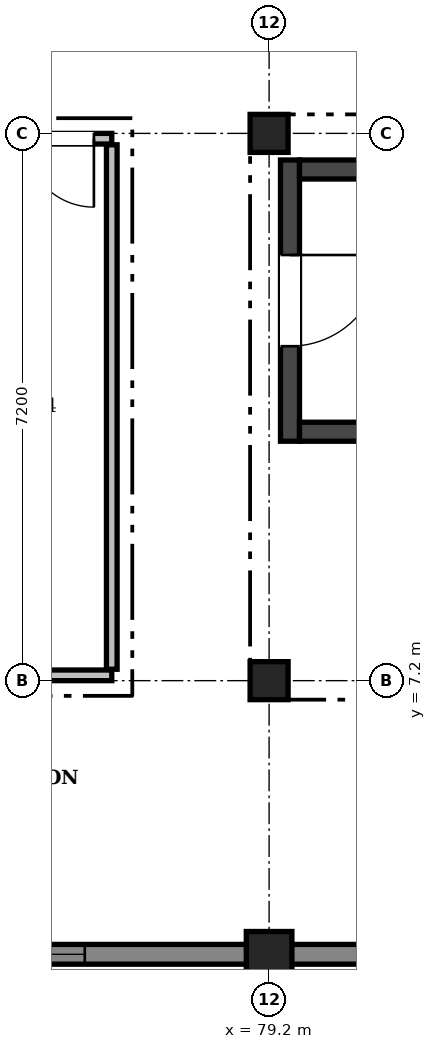
"""IFC4 building model, lengths in metres.
Left out: names, types, materials, properties, quantities, classifications, styles, units other than length and angle.
Written with IfcOpenShell. Run it as: python <this file> out.ifc"""

import sys

from ifc_helpers import new_model, si_unit, direction, frame, frame_2d, origin, origin_2d, place, context, subcontext, project, spatial, rectangle, extrude, element, fill, save


model = new_model("IFC4")
c1 = context("Model", 3, precision=1e-05, world=origin(), true_north=direction((0.0, 1.0)))
c2 = subcontext(c1, "Body", "Model", "MODEL_VIEW")
j1 = project(units=[si_unit("LENGTHUNIT", "METRE"), si_unit("PLANEANGLEUNIT", "RADIAN")], contexts=[c1])
p1 = place(None, origin())
s1 = spatial("IfcSite", under=j1, at=p1, CompositionType="ELEMENT")
p2 = place(p1, origin())
s2 = spatial("IfcBuilding", under=s1, at=p2, CompositionType="ELEMENT")
p3 = place(p2, frame((0.0, 0.0, 32.4)))
s3 = spatial("IfcBuildingStorey", under=s2, at=p3, CompositionType="ELEMENT", Elevation=32.4)
p4 = place(p3, frame((79.2, 3.6, 0.0), z_axis=(0.0, 0.0, 1.0), x_axis=(1.0, 0.0, 0.0)))
e1 = element("IfcColumn", 1, at=p4, inside=s3, PredefinedType="COLUMN", context=c2, shape_type="SweptSolid", body=[
    extrude(rectangle(XDim=0.6, YDim=0.6, at=origin_2d()), origin(), (0.0, 0.0, 1.0), 4.5),
])
for number, where, z_axis, x_axis in (
    (2, (79.2, 7.2, 0.0), (0.0, 0.0, 1.0), (1.0, 0.0, 0.0)),
    (3, (79.2, 14.4, 0.0), (0.0, 0.0, 1.0), (1.0, 0.0, 0.0)),
):
    element("IfcColumn", number, at=place(p3, frame(where, z_axis=z_axis, x_axis=x_axis)), inside=s3, PredefinedType="COLUMN", context=c2, shape_type="SweptSolid", body=[
        extrude(rectangle(XDim=0.5, YDim=0.5, at=origin_2d()), origin(), (0.0, 0.0, 1.0), 4.5),
    ])
p5 = place(p3, frame((86.4, 3.6, 0.0), z_axis=(0.0, 0.0, 1.0), x_axis=(-1.0, 0.0, 0.0)))
e4 = element("IfcWall", 4, at=p5, inside=s3, PredefinedType="SOLIDWALL", context=c2, shape_type="SweptSolid", body=[
    extrude(rectangle(XDim=7.2, YDim=0.26, at=frame_2d((3.6, 0.0))), origin(), (0.0, 0.0, 1.0), 4.22),
])
p6 = place(p5, frame((2.45, 0.0, 0.95)))
e5 = element("IfcOpeningElement", 5, at=p6, cuts=e4, PredefinedType="OPENING", context=c2, shape_type="SweptSolid", body=[
    extrude(rectangle(XDim=2.3, YDim=1.3, at=frame_2d((1.15, 0.65))), frame((0.0, 0.142, 0.0), z_axis=(0.0, -1.0, 0.0), x_axis=(1.0, 0.0, 0.0)), (0.0, 0.0, 1.0), 0.284),
])
p7 = place(p3, frame((79.2, 3.6, 0.0), z_axis=(0.0, 0.0, 1.0), x_axis=(-1.0, 0.0, 0.0)))
e6 = element("IfcWall", 6, at=p7, inside=s3, PredefinedType="SOLIDWALL", context=c2, shape_type="SweptSolid", body=[
    extrude(rectangle(XDim=7.35, YDim=0.26, at=frame_2d((3.675, 0.0))), origin(), (0.0, 0.0, 1.0), 4.22),
])
p8 = place(p7, frame((2.425, 0.0, 0.95)))
e7 = element("IfcOpeningElement", 7, at=p8, cuts=e6, PredefinedType="OPENING", context=c2, shape_type="SweptSolid", body=[
    extrude(rectangle(XDim=2.5, YDim=1.3, at=frame_2d((1.25, 0.65))), frame((0.0, 0.142, 0.0), z_axis=(0.0, -1.0, 0.0), x_axis=(1.0, 0.0, 0.0)), (0.0, 0.0, 1.0), 0.284),
])
p9 = place(p3, frame((79.475, 10.35, 0.0), z_axis=(0.0, 0.0, 1.0), x_axis=(0.0, 1.0, 0.0)))
e8 = element("IfcWall", 8, at=p9, inside=s3, PredefinedType="SHEAR", context=c2, shape_type="SweptSolid", body=[
    extrude(rectangle(XDim=3.7, YDim=0.25, at=frame_2d((1.85, 0.0))), origin(), (0.0, 0.0, 1.0), 4.25),
])
p10 = place(p9, frame((1.25, 0.0, 0.0)))
e9 = element("IfcOpeningElement", 9, at=p10, cuts=e8, PredefinedType="OPENING", context=c2, shape_type="SweptSolid", body=[
    extrude(rectangle(XDim=1.2, YDim=2.15, at=frame_2d((0.6, 1.075))), frame((0.0, 0.137, 0.0), z_axis=(0.0, -1.0, 0.0), x_axis=(1.0, 0.0, 0.0)), (0.0, 0.0, 1.0), 0.274),
])
for number, where, z_axis, x_axis in (
    (10, (79.6, 10.475, 0.0), (0.0, 0.0, 1.0), (1.0, 0.0, 0.0)),
    (11, (79.6, 13.925, 0.0), (0.0, 0.0, 1.0), (1.0, 0.0, 0.0)),
):
    element("IfcWall", number, at=place(p3, frame(where, z_axis=z_axis, x_axis=x_axis)), inside=s3, PredefinedType="SHEAR", context=c2, shape_type="SweptSolid", body=[
        extrude(rectangle(XDim=7.6, YDim=0.25, at=frame_2d((3.8, 0.0))), origin(), (0.0, 0.0, 1.0), 4.25),
    ])
p11 = place(p3, frame((72.07, 7.27, 0.0), z_axis=(0.0, 0.0, 1.0), x_axis=(1.0, 0.0, 0.0)))
e12 = element("IfcWall", 12, at=p11, inside=s3, PredefinedType="PARTITIONING", context=c2, shape_type="SweptSolid", body=[
    extrude(rectangle(XDim=5.06, YDim=0.14, at=frame_2d((2.53, 0.0))), origin(), (0.0, 0.0, 1.0), 3.78),
])
p12 = place(p3, frame((72.07, 14.33, 0.0), z_axis=(0.0, 0.0, 1.0), x_axis=(1.0, 0.0, 0.0)))
e13 = element("IfcWall", 13, at=p12, inside=s3, PredefinedType="PARTITIONING", context=c2, shape_type="SweptSolid", body=[
    extrude(rectangle(XDim=5.06, YDim=0.14, at=frame_2d((2.53, 0.0))), origin(), (0.0, 0.0, 1.0), 3.78),
])
p13 = place(p12, frame((0.88, 0.0, 0.0)))
e14 = element("IfcOpeningElement", 14, at=p13, cuts=e13, PredefinedType="OPENING", context=c2, shape_type="SweptSolid", body=[
    extrude(rectangle(XDim=0.94, YDim=2.1, at=frame_2d((0.47, 1.05))), frame((0.0, 0.082, 0.0), z_axis=(0.0, -1.0, 0.0), x_axis=(1.0, 0.0, 0.0)), (0.0, 0.0, 1.0), 0.164),
])
p14 = place(p12, frame((2.415, 0.0, 0.0)))
e15 = element("IfcOpeningElement", 15, at=p14, cuts=e13, PredefinedType="OPENING", context=c2, shape_type="SweptSolid", body=[
    extrude(rectangle(XDim=0.9, YDim=2.08, at=frame_2d((0.45, 1.04))), frame((0.0, 0.082, 0.0), z_axis=(0.0, -1.0, 0.0), x_axis=(1.0, 0.0, 0.0)), (0.0, 0.0, 1.0), 0.164),
])
p15 = place(p12, frame((3.925, 0.0, 0.0)))
e16 = element("IfcOpeningElement", 16, at=p15, cuts=e13, PredefinedType="OPENING", context=c2, shape_type="SweptSolid", body=[
    extrude(rectangle(XDim=0.9, YDim=2.08, at=frame_2d((0.45, 1.04))), frame((0.0, 0.082, 0.0), z_axis=(0.0, -1.0, 0.0), x_axis=(1.0, 0.0, 0.0)), (0.0, 0.0, 1.0), 0.164),
])
p16 = place(p3, frame((77.13, 7.35, 0.0), z_axis=(0.0, 0.0, 1.0), x_axis=(0.0, 1.0, 0.0)))
e17 = element("IfcWall", 17, at=p16, inside=s3, PredefinedType="PARTITIONING", context=c2, shape_type="SweptSolid", body=[
    extrude(rectangle(XDim=6.9, YDim=0.14, at=frame_2d((3.45, 0.0))), origin(), (0.0, 0.0, 1.0), 4.16),
])
p17 = place(p8, origin())
e18 = element("IfcWindow", 18, at=p17, inside=s3, PartitioningType="SINGLE_PANEL", PredefinedType="WINDOW", context=c2, shape_type="SweptSolid", body=[
    extrude(rectangle(XDim=2.5, YDim=1.3, at=frame_2d((1.25, 0.65))), frame((0.0, 0.03, 0.0), z_axis=(0.0, -1.0, 0.0), x_axis=(1.0, 0.0, 0.0)), (0.0, 0.0, 1.0), 0.06),
])
fill(e7, e18)
p18 = place(p10, frame((1.2, 0.0, 0.0), z_axis=(0.0, 0.0, 1.0), x_axis=(-1.0, 0.0, 0.0)))
e19 = element("IfcDoor", 19, at=p18, inside=s3, OperationType="SINGLE_SWING_LEFT", PredefinedType="DOOR", context=c2, shape_type="SweptSolid", body=[
    extrude(rectangle(XDim=1.2, YDim=2.15, at=frame_2d((0.6, 1.075))), frame((0.0, 0.025, 0.0), z_axis=(0.0, -1.0, 0.0), x_axis=(1.0, 0.0, 0.0)), (0.0, 0.0, 1.0), 0.05),
])
fill(e9, e19)
p19 = place(p15, frame((0.9, 0.0, 0.0), z_axis=(0.0, 0.0, 1.0), x_axis=(-1.0, 0.0, 0.0)))
e20 = element("IfcDoor", 20, at=p19, inside=s3, OperationType="SINGLE_SWING_LEFT", PredefinedType="DOOR", context=c2, shape_type="SweptSolid", body=[
    extrude(rectangle(XDim=0.9, YDim=2.08, at=frame_2d((0.45, 1.04))), frame((0.0, 0.025, 0.0), z_axis=(0.0, -1.0, 0.0), x_axis=(1.0, 0.0, 0.0)), (0.0, 0.0, 1.0), 0.05),
])
fill(e16, e20)
save(model, sys.argv[1])
